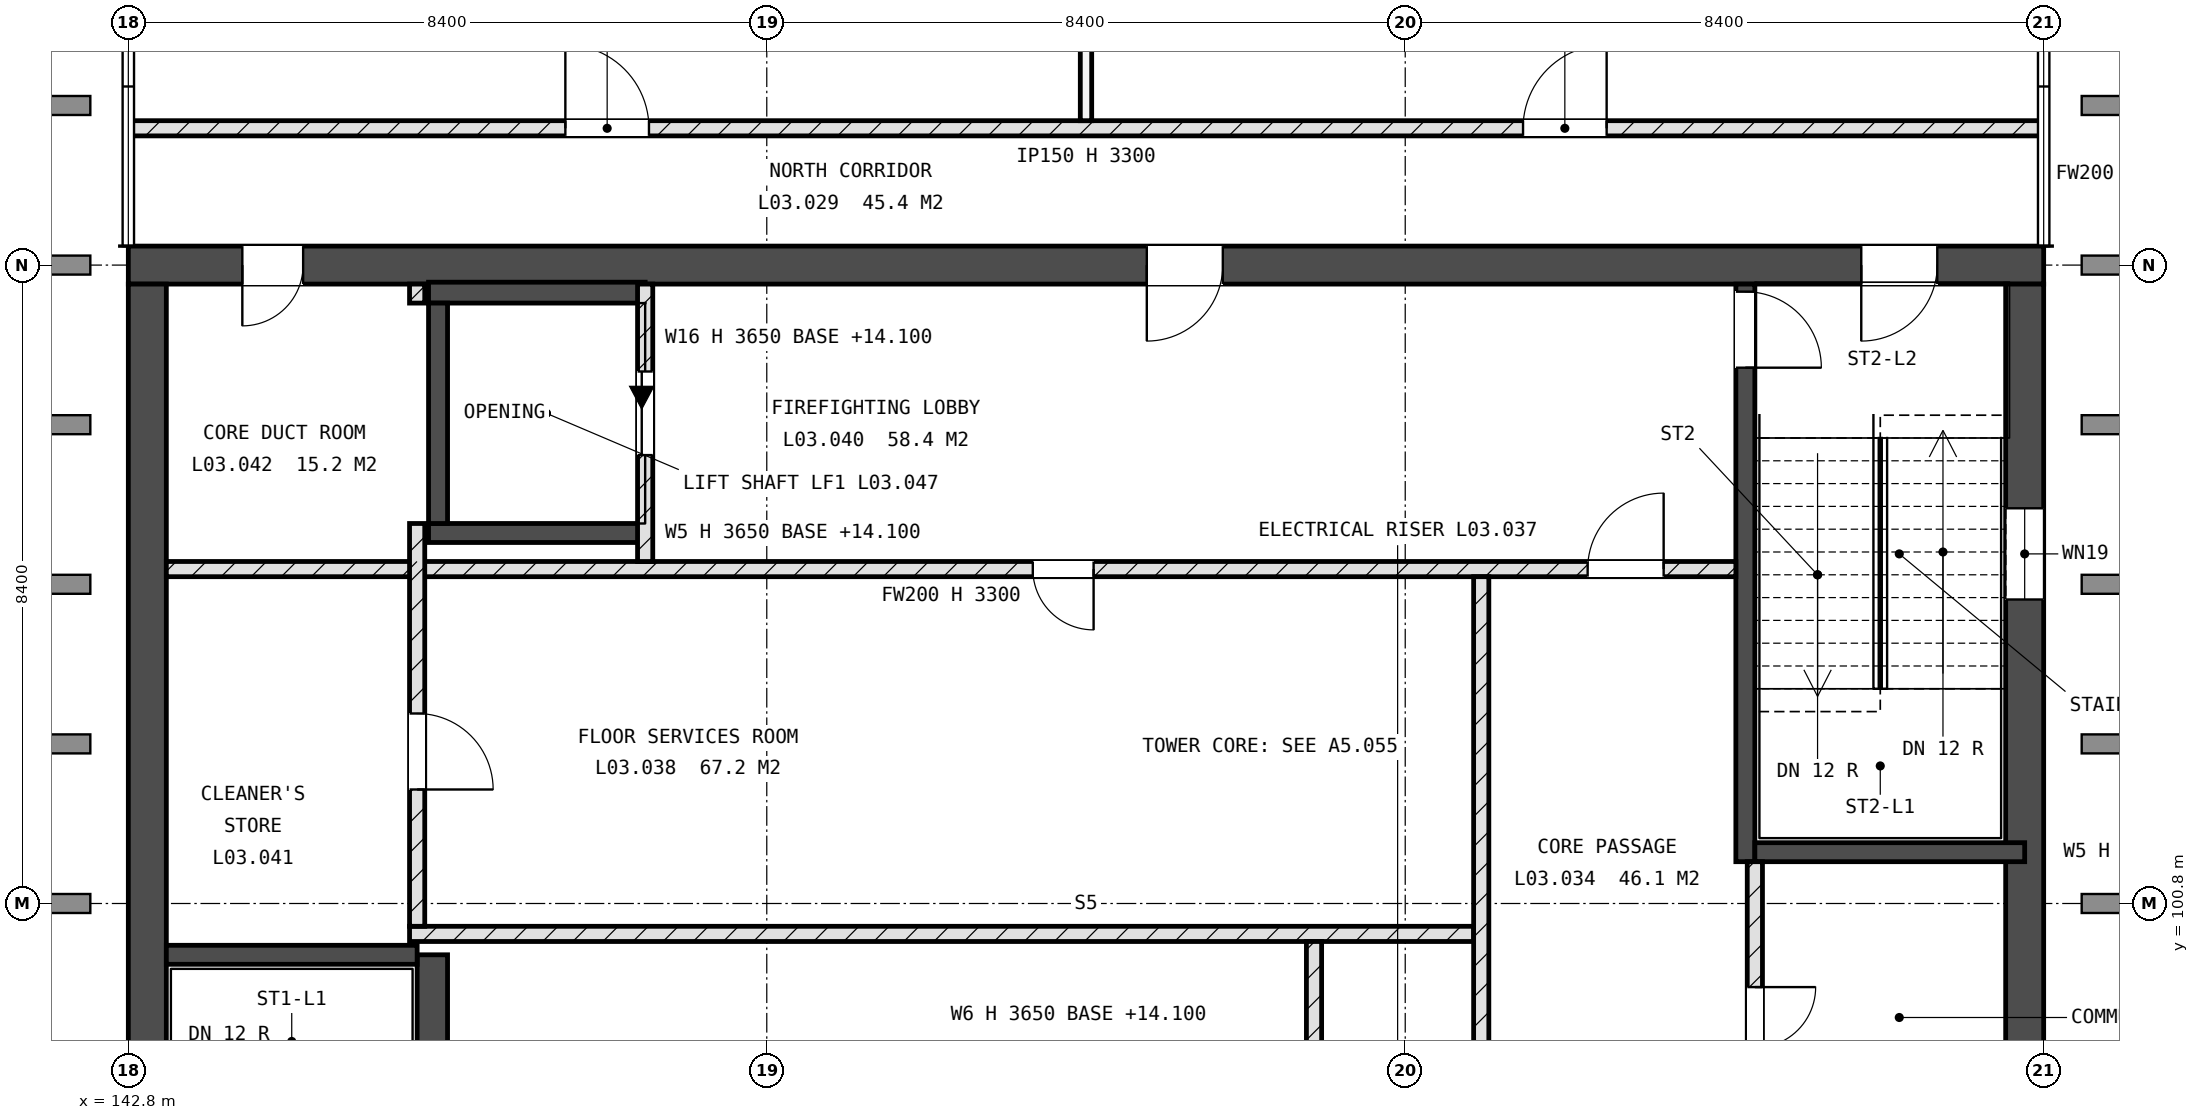
"""IFC4 building model, lengths in metres.
Left out: names, types, materials, properties, quantities, classifications, styles, units other than length and angle.
Written with IfcOpenShell. Run it as: python <this file> out.ifc"""

import sys

from ifc_helpers import new_model, si_unit, direction, frame, frame_2d, origin, place, context, subcontext, project, spatial, rectangle, extrude, element, fill, save


model = new_model("IFC4")
c1 = context("Model", 3, precision=1e-05, world=origin(), true_north=direction((0.0, 1.0)))
c2 = subcontext(c1, "Body", "Model", "MODEL_VIEW")
j1 = project(units=[si_unit("LENGTHUNIT", "METRE"), si_unit("PLANEANGLEUNIT", "RADIAN")], contexts=[c1])
p1 = place(None, origin())
s1 = spatial("IfcSite", under=j1, at=p1, CompositionType="ELEMENT")
p2 = place(p1, origin())
s2 = spatial("IfcBuilding", under=s1, at=p2, CompositionType="ELEMENT")
p3 = place(p2, frame((0.0, 0.0, 14.4)))
s3 = spatial("IfcBuildingStorey", under=s2, at=p3, CompositionType="ELEMENT", Elevation=14.4)
p4 = place(p3, frame((142.8, 109.2, -0.3), z_axis=(0.0, 0.0, 1.0), x_axis=(1.0, 0.0, 0.0)))
e1 = element("IfcWall", 1, at=p4, inside=s3, PredefinedType="SHEAR", context=c2, shape_type="SweptSolid", body=[
    extrude(rectangle(XDim=25.2, YDim=0.5, at=frame_2d((12.6, 0.0))), origin(), (0.0, 0.0, 1.0), 3.65),
])
p5 = place(p4, frame((22.8, 0.0, 0.3)))
e2 = element("IfcOpeningElement", 2, at=p5, cuts=e1, PredefinedType="OPENING", context=c2, shape_type="SweptSolid", body=[
    extrude(rectangle(XDim=1.0, YDim=2.1, at=frame_2d((0.5, 1.05))), frame((0.0, 0.26, 0.0), z_axis=(0.0, -1.0, 0.0), x_axis=(1.0, 0.0, 0.0)), (0.0, 0.0, 1.0), 0.52),
])
p6 = place(p4, frame((1.5, 0.0, 0.3)))
e3 = element("IfcOpeningElement", 3, at=p6, cuts=e1, PredefinedType="OPENING", context=c2, shape_type="SweptSolid", body=[
    extrude(rectangle(XDim=0.8, YDim=2.1, at=frame_2d((0.4, 1.05))), frame((0.0, 0.26, 0.0), z_axis=(0.0, -1.0, 0.0), x_axis=(1.0, 0.0, 0.0)), (0.0, 0.0, 1.0), 0.52),
])
p7 = place(p4, frame((13.4, 0.0, 0.3)))
e4 = element("IfcOpeningElement", 4, at=p7, cuts=e1, PredefinedType="OPENING", context=c2, shape_type="SweptSolid", body=[
    extrude(rectangle(XDim=1.0, YDim=2.1, at=frame_2d((0.5, 1.05))), frame((0.0, 0.26, 0.0), z_axis=(0.0, -1.0, 0.0), x_axis=(1.0, 0.0, 0.0)), (0.0, 0.0, 1.0), 0.52),
])
p8 = place(p3, frame((143.05, 92.65, -0.3), z_axis=(0.0, 0.0, 1.0), x_axis=(0.0, 1.0, 0.0)))
e5 = element("IfcWall", 5, at=p8, inside=s3, PredefinedType="SHEAR", context=c2, shape_type="SweptSolid", body=[
    extrude(rectangle(XDim=16.3, YDim=0.5, at=frame_2d((8.15, 0.0))), origin(), (0.0, 0.0, 1.0), 3.65),
])
p9 = place(p8, frame((2.95, 0.0, 1.9)))
e6 = element("IfcOpeningElement", 6, at=p9, cuts=e5, PredefinedType="OPENING", context=c2, shape_type="SweptSolid", body=[
    extrude(rectangle(XDim=1.2, YDim=0.9, at=frame_2d((0.6, 0.45))), frame((0.0, 0.26, 0.0), z_axis=(0.0, -1.0, 0.0), x_axis=(1.0, 0.0, 0.0)), (0.0, 0.0, 1.0), 0.52),
])
p10 = place(p3, frame((167.75, 92.65, -0.3), z_axis=(0.0, 0.0, 1.0), x_axis=(0.0, 1.0, 0.0)))
e7 = element("IfcWall", 7, at=p10, inside=s3, PredefinedType="SHEAR", context=c2, shape_type="SweptSolid", body=[
    extrude(rectangle(XDim=16.3, YDim=0.5, at=frame_2d((8.15, 0.0))), origin(), (0.0, 0.0, 1.0), 3.65),
])
p11 = place(p10, frame((12.15, 0.0, 1.9)))
e8 = element("IfcOpeningElement", 8, at=p11, cuts=e7, PredefinedType="OPENING", context=c2, shape_type="SweptSolid", body=[
    extrude(rectangle(XDim=1.2, YDim=0.9, at=frame_2d((0.6, 0.45))), frame((0.0, 0.26, 0.0), z_axis=(0.0, -1.0, 0.0), x_axis=(1.0, 0.0, 0.0)), (0.0, 0.0, 1.0), 0.52),
])
p12 = place(p3, frame((146.8, 92.65, -0.3), z_axis=(0.0, 0.0, 1.0), x_axis=(0.0, 1.0, 0.0)))
e9 = element("IfcWall", 9, at=p12, inside=s3, PredefinedType="SHEAR", context=c2, shape_type="SweptSolid", body=[
    extrude(rectangle(XDim=7.475, YDim=0.4, at=frame_2d((3.738, 0.0))), origin(), (0.0, 0.0, 1.0), 3.65),
])
p13 = place(p12, frame((0.1, 0.0, 0.3)))
e10 = element("IfcOpeningElement", 10, at=p13, cuts=e9, PredefinedType="OPENING", context=c2, shape_type="SweptSolid", body=[
    extrude(rectangle(XDim=1.0, YDim=2.1, at=frame_2d((0.5, 1.05))), frame((0.0, 0.21, 0.0), z_axis=(0.0, -1.0, 0.0), x_axis=(1.0, 0.0, 0.0)), (0.0, 0.0, 1.0), 0.42),
])
p14 = place(p3, frame((143.3, 100.125, -0.3), z_axis=(0.0, 0.0, 1.0), x_axis=(1.0, 0.0, 0.0)))
e11 = element("IfcWall", 11, at=p14, inside=s3, PredefinedType="SHEAR", context=c2, shape_type="SweptSolid", body=[
    extrude(rectangle(XDim=3.3, YDim=0.25, at=frame_2d((1.65, 0.0))), origin(), (0.0, 0.0, 1.0), 3.65),
])
p15 = place(p3, frame((164.075, 101.35, -0.3), z_axis=(0.0, 0.0, 1.0), x_axis=(0.0, 1.0, 0.0)))
e12 = element("IfcWall", 12, at=p15, inside=s3, PredefinedType="SHEAR", context=c2, shape_type="SweptSolid", body=[
    extrude(rectangle(XDim=7.6, YDim=0.25, at=frame_2d((3.8, 0.0))), origin(), (0.0, 0.0, 1.0), 3.65),
])
p16 = place(p15, frame((6.5, 0.0, 0.3)))
e13 = element("IfcOpeningElement", 13, at=p16, cuts=e12, PredefinedType="OPENING", context=c2, shape_type="SweptSolid", body=[
    extrude(rectangle(XDim=1.0, YDim=2.1, at=frame_2d((0.5, 1.05))), frame((0.0, 0.135, 0.0), z_axis=(0.0, -1.0, 0.0), x_axis=(1.0, 0.0, 0.0)), (0.0, 0.0, 1.0), 0.27),
])
p17 = place(p3, frame((164.2, 101.475, -0.3), z_axis=(0.0, 0.0, 1.0), x_axis=(1.0, 0.0, 0.0)))
e14 = element("IfcWall", 14, at=p17, inside=s3, PredefinedType="SHEAR", context=c2, shape_type="SweptSolid", body=[
    extrude(rectangle(XDim=3.55, YDim=0.25, at=frame_2d((1.775, 0.0))), origin(), (0.0, 0.0, 1.0), 3.65),
])
p18 = place(p3, frame((146.75, 105.675, -0.3), z_axis=(0.0, 0.0, 1.0), x_axis=(1.0, 0.0, 0.0)))
e15 = element("IfcWall", 15, at=p18, inside=s3, PredefinedType="SHEAR", context=c2, shape_type="SweptSolid", body=[
    extrude(rectangle(XDim=2.85, YDim=0.25, at=frame_2d((1.425, 0.0))), origin(), (0.0, 0.0, 1.0), 3.65),
])
p19 = place(p3, frame((146.75, 108.837, -0.3), z_axis=(0.0, 0.0, 1.0), x_axis=(1.0, 0.0, 0.0)))
e16 = element("IfcWall", 16, at=p19, inside=s3, PredefinedType="SHEAR", context=c2, shape_type="SweptSolid", body=[
    extrude(rectangle(XDim=2.85, YDim=0.275, at=frame_2d((1.425, 0.0))), origin(), (0.0, 0.0, 1.0), 3.65),
])
p20 = place(p3, frame((146.875, 105.8, -0.3), z_axis=(0.0, 0.0, 1.0), x_axis=(0.0, 1.0, 0.0)))
e17 = element("IfcWall", 17, at=p20, inside=s3, PredefinedType="SHEAR", context=c2, shape_type="SweptSolid", body=[
    extrude(rectangle(XDim=2.9, YDim=0.25, at=frame_2d((1.45, 0.0))), origin(), (0.0, 0.0, 1.0), 3.65),
])
p21 = place(p3, frame((146.5, 100.4, 0.0), z_axis=(0.0, 0.0, 1.0), x_axis=(1.0, 0.0, 0.0)))
e18 = element("IfcWall", 18, at=p21, inside=s3, PredefinedType="SOLIDWALL", context=c2, shape_type="SweptSolid", body=[
    extrude(rectangle(XDim=14.0, YDim=0.2, at=frame_2d((7.0, 0.0))), origin(), (0.0, 0.0, 1.0), 3.3),
])
p22 = place(p3, frame((143.3, 105.2, 0.0), z_axis=(0.0, 0.0, 1.0), x_axis=(1.0, 0.0, 0.0)))
e19 = element("IfcWall", 19, at=p22, inside=s3, PredefinedType="SOLIDWALL", context=c2, shape_type="SweptSolid", body=[
    extrude(rectangle(XDim=20.65, YDim=0.2, at=frame_2d((10.325, 0.0))), origin(), (0.0, 0.0, 1.0), 3.3),
])
p23 = place(p22, frame((11.4, 0.0, 0.0)))
e20 = element("IfcOpeningElement", 20, at=p23, cuts=e19, PredefinedType="OPENING", context=c2, shape_type="SweptSolid", body=[
    extrude(rectangle(XDim=0.8, YDim=2.1, at=frame_2d((0.4, 1.05))), frame((0.0, 0.11, 0.0), z_axis=(0.0, -1.0, 0.0), x_axis=(1.0, 0.0, 0.0)), (0.0, 0.0, 1.0), 0.22),
])
p24 = place(p22, frame((18.7, 0.0, 0.0)))
e21 = element("IfcOpeningElement", 21, at=p24, cuts=e19, PredefinedType="OPENING", context=c2, shape_type="SweptSolid", body=[
    extrude(rectangle(XDim=1.0, YDim=2.1, at=frame_2d((0.5, 1.05))), frame((0.0, 0.11, 0.0), z_axis=(0.0, -1.0, 0.0), x_axis=(1.0, 0.0, 0.0)), (0.0, 0.0, 1.0), 0.22),
])
p25 = place(p3, frame((142.8, 111.0, 0.0), z_axis=(0.0, 0.0, 1.0), x_axis=(1.0, 0.0, 0.0)))
e22 = element("IfcWall", 22, at=p25, inside=s3, PredefinedType="SOLIDWALL", context=c2, shape_type="SweptSolid", body=[
    extrude(rectangle(XDim=25.2, YDim=0.2, at=frame_2d((12.6, 0.0))), origin(), (0.0, 0.0, 1.0), 3.3),
])
p26 = place(p25, frame((5.75, 0.0, 0.0)))
e23 = element("IfcOpeningElement", 23, at=p26, cuts=e22, PredefinedType="OPENING", context=c2, shape_type="SweptSolid", body=[
    extrude(rectangle(XDim=1.1, YDim=2.25, at=frame_2d((0.55, 1.125))), frame((0.0, 0.11, 0.0), z_axis=(0.0, -1.0, 0.0), x_axis=(1.0, 0.0, 0.0)), (0.0, 0.0, 1.0), 0.22),
])
p27 = place(p25, frame((18.35, 0.0, 0.0)))
e24 = element("IfcOpeningElement", 24, at=p27, cuts=e22, PredefinedType="OPENING", context=c2, shape_type="SweptSolid", body=[
    extrude(rectangle(XDim=1.1, YDim=2.25, at=frame_2d((0.55, 1.125))), frame((0.0, 0.11, 0.0), z_axis=(0.0, -1.0, 0.0), x_axis=(1.0, 0.0, 0.0)), (0.0, 0.0, 1.0), 0.22),
])
p28 = place(p3, frame((146.6, 100.5, 0.0), z_axis=(0.0, 0.0, 1.0), x_axis=(0.0, 1.0, 0.0)))
e25 = element("IfcWall", 25, at=p28, inside=s3, PredefinedType="SOLIDWALL", context=c2, shape_type="SweptSolid", body=[
    extrude(rectangle(XDim=5.3, YDim=0.2, at=frame_2d((2.65, 0.0))), origin(), (0.0, 0.0, 1.0), 3.3),
])
p29 = place(p28, frame((1.8, 0.0, 0.0)))
e26 = element("IfcOpeningElement", 26, at=p29, cuts=e25, PredefinedType="OPENING", context=c2, shape_type="SweptSolid", body=[
    extrude(rectangle(XDim=1.0, YDim=2.1, at=frame_2d((0.5, 1.05))), frame((0.0, 0.11, 0.0), z_axis=(0.0, -1.0, 0.0), x_axis=(1.0, 0.0, 0.0)), (0.0, 0.0, 1.0), 0.22),
])
p30 = place(p3, frame((146.6, 108.7, 0.0), z_axis=(0.0, 0.0, 1.0), x_axis=(0.0, 1.0, 0.0)))
e27 = element("IfcWall", 27, at=p30, inside=s3, PredefinedType="SOLIDWALL", context=c2, shape_type="SweptSolid", body=[
    extrude(rectangle(XDim=0.25, YDim=0.2, at=frame_2d((0.125, 0.0))), origin(), (0.0, 0.0, 1.0), 3.3),
])
p31 = place(p3, frame((149.6, 105.3, 0.0), z_axis=(0.0, 0.0, 1.0), x_axis=(0.0, 1.0, 0.0)))
e28 = element("IfcWall", 28, at=p31, inside=s3, PredefinedType="SOLIDWALL", context=c2, shape_type="SweptSolid", body=[
    extrude(rectangle(XDim=3.65, YDim=0.2, at=frame_2d((1.825, 0.0))), origin(), (0.0, 0.0, 1.0), 3.3),
])
p32 = place(p31, frame((1.4, 0.0, 0.0)))
e29 = element("IfcOpeningElement", 29, at=p32, cuts=e28, PredefinedType="OPENING", context=c2, shape_type="SweptSolid", body=[
    extrude(rectangle(XDim=1.1, YDim=2.1, at=frame_2d((0.55, 1.05))), frame((0.0, 0.11, 0.0), z_axis=(0.0, -1.0, 0.0), x_axis=(1.0, 0.0, 0.0)), (0.0, 0.0, 1.0), 0.22),
])
p33 = place(p3, frame((155.4, 111.1, 0.0), z_axis=(0.0, 0.0, 1.0), x_axis=(0.0, 1.0, 0.0)))
e30 = element("IfcWall", 30, at=p33, inside=s3, PredefinedType="PARTITIONING", context=c2, shape_type="SweptSolid", body=[
    extrude(rectangle(XDim=6.5, YDim=0.15, at=frame_2d((3.25, 0.0))), origin(), (0.0, 0.0, 1.0), 3.3),
])
p34 = place(p3, frame((158.4, 98.7, 0.0), z_axis=(0.0, 0.0, 1.0), x_axis=(0.0, 1.0, 0.0)))
e31 = element("IfcWall", 31, at=p34, inside=s3, PredefinedType="SOLIDWALL", context=c2, shape_type="SweptSolid", body=[
    extrude(rectangle(XDim=1.6, YDim=0.2, at=frame_2d((0.8, 0.0))), origin(), (0.0, 0.0, 1.0), 3.3),
])
p35 = place(p3, frame((160.6, 92.65, 0.0), z_axis=(0.0, 0.0, 1.0), x_axis=(0.0, 1.0, 0.0)))
e32 = element("IfcWall", 32, at=p35, inside=s3, PredefinedType="SOLIDWALL", context=c2, shape_type="SweptSolid", body=[
    extrude(rectangle(XDim=12.45, YDim=0.2, at=frame_2d((6.225, 0.0))), origin(), (0.0, 0.0, 1.0), 3.3),
])
p36 = place(p35, frame((5.05, 0.0, 0.0)))
e33 = element("IfcOpeningElement", 33, at=p36, cuts=e32, PredefinedType="OPENING", context=c2, shape_type="SweptSolid", body=[
    extrude(rectangle(XDim=0.8, YDim=2.1, at=frame_2d((0.4, 1.05))), frame((0.0, 0.11, 0.0), z_axis=(0.0, -1.0, 0.0), x_axis=(1.0, 0.0, 0.0)), (0.0, 0.0, 1.0), 0.22),
])
p37 = place(p35, frame((0.75, 0.0, 0.0)))
e34 = element("IfcOpeningElement", 34, at=p37, cuts=e32, PredefinedType="OPENING", context=c2, shape_type="SweptSolid", body=[
    extrude(rectangle(XDim=1.0, YDim=2.1, at=frame_2d((0.5, 1.05))), frame((0.0, 0.11, 0.0), z_axis=(0.0, -1.0, 0.0), x_axis=(1.0, 0.0, 0.0)), (0.0, 0.0, 1.0), 0.22),
])
p38 = place(p3, frame((164.2, 92.65, 0.0), z_axis=(0.0, 0.0, 1.0), x_axis=(0.0, 1.0, 0.0)))
e35 = element("IfcWall", 35, at=p38, inside=s3, PredefinedType="SOLIDWALL", context=c2, shape_type="SweptSolid", body=[
    extrude(rectangle(XDim=8.7, YDim=0.2, at=frame_2d((4.35, 0.0))), origin(), (0.0, 0.0, 1.0), 3.3),
])
p39 = place(p38, frame((1.65, 0.0, 0.0)))
e36 = element("IfcOpeningElement", 36, at=p39, cuts=e35, PredefinedType="OPENING", context=c2, shape_type="SweptSolid", body=[
    extrude(rectangle(XDim=0.8, YDim=2.1, at=frame_2d((0.4, 1.05))), frame((0.0, 0.11, 0.0), z_axis=(0.0, -1.0, 0.0), x_axis=(1.0, 0.0, 0.0)), (0.0, 0.0, 1.0), 0.22),
])
p40 = place(p38, frame((6.25, 0.0, 0.0)))
e37 = element("IfcOpeningElement", 37, at=p40, cuts=e35, PredefinedType="OPENING", context=c2, shape_type="SweptSolid", body=[
    extrude(rectangle(XDim=0.8, YDim=2.1, at=frame_2d((0.4, 1.05))), frame((0.0, 0.11, 0.0), z_axis=(0.0, -1.0, 0.0), x_axis=(1.0, 0.0, 0.0)), (0.0, 0.0, 1.0), 0.22),
])
p41 = place(p11, origin())
e38 = element("IfcWindow", 38, at=p41, inside=s3, PartitioningType="SINGLE_PANEL", PredefinedType="WINDOW", context=c2, shape_type="SweptSolid", body=[
    extrude(rectangle(XDim=1.2, YDim=0.9, at=frame_2d((0.6, 0.45))), frame((0.0, 0.03, 0.0), z_axis=(0.0, -1.0, 0.0), x_axis=(1.0, 0.0, 0.0)), (0.0, 0.0, 1.0), 0.06),
])
fill(e8, e38)
p42 = place(p32, origin())
e39 = element("IfcDoor", 39, at=p42, inside=s3, OperationType="SLIDING_TO_LEFT", PredefinedType="DOOR", context=c2, shape_type="SweptSolid", body=[
    extrude(rectangle(XDim=1.1, YDim=2.1, at=frame_2d((0.55, 1.05))), frame((0.0, 0.025, 0.0), z_axis=(0.0, -1.0, 0.0), x_axis=(1.0, 0.0, 0.0)), (0.0, 0.0, 1.0), 0.05),
])
fill(e29, e39)
p43 = place(p16, origin())
e40 = element("IfcDoor", 40, at=p43, inside=s3, OperationType="SINGLE_SWING_LEFT", PredefinedType="DOOR", context=c2, shape_type="SweptSolid", body=[
    extrude(rectangle(XDim=1.0, YDim=2.1, at=frame_2d((0.5, 1.05))), frame((0.0, 0.025, 0.0), z_axis=(0.0, -1.0, 0.0), x_axis=(1.0, 0.0, 0.0)), (0.0, 0.0, 1.0), 0.05),
])
fill(e13, e40)
p44 = place(p5, origin())
e41 = element("IfcDoor", 41, at=p44, inside=s3, OperationType="SINGLE_SWING_LEFT", PredefinedType="DOOR", context=c2, shape_type="SweptSolid", body=[
    extrude(rectangle(XDim=1.0, YDim=2.1, at=frame_2d((0.5, 1.05))), frame((0.0, 0.025, 0.0), z_axis=(0.0, -1.0, 0.0), x_axis=(1.0, 0.0, 0.0)), (0.0, 0.0, 1.0), 0.05),
])
fill(e2, e41)
p45 = place(p26, origin())
e42 = element("IfcDoor", 42, at=p45, inside=s3, OperationType="SINGLE_SWING_RIGHT", PredefinedType="DOOR", context=c2, shape_type="SweptSolid", body=[
    extrude(rectangle(XDim=1.1, YDim=2.25, at=frame_2d((0.55, 1.125))), frame((0.0, 0.025, 0.0), z_axis=(0.0, -1.0, 0.0), x_axis=(1.0, 0.0, 0.0)), (0.0, 0.0, 1.0), 0.05),
])
fill(e23, e42)
p46 = place(p27, origin())
e43 = element("IfcDoor", 43, at=p46, inside=s3, OperationType="SINGLE_SWING_LEFT", PredefinedType="DOOR", context=c2, shape_type="SweptSolid", body=[
    extrude(rectangle(XDim=1.1, YDim=2.25, at=frame_2d((0.55, 1.125))), frame((0.0, 0.025, 0.0), z_axis=(0.0, -1.0, 0.0), x_axis=(1.0, 0.0, 0.0)), (0.0, 0.0, 1.0), 0.05),
])
fill(e24, e43)
p47 = place(p40, origin())
e44 = element("IfcDoor", 44, at=p47, inside=s3, OperationType="SINGLE_SWING_RIGHT", PredefinedType="DOOR", context=c2, shape_type="SweptSolid", body=[
    extrude(rectangle(XDim=0.8, YDim=2.1, at=frame_2d((0.4, 1.05))), frame((0.0, 0.025, 0.0), z_axis=(0.0, -1.0, 0.0), x_axis=(1.0, 0.0, 0.0)), (0.0, 0.0, 1.0), 0.05),
])
fill(e37, e44)
p48 = place(p23, origin())
e45 = element("IfcDoor", 45, at=p48, inside=s3, OperationType="SINGLE_SWING_RIGHT", PredefinedType="DOOR", context=c2, shape_type="SweptSolid", body=[
    extrude(rectangle(XDim=0.8, YDim=2.1, at=frame_2d((0.4, 1.05))), frame((0.0, 0.025, 0.0), z_axis=(0.0, -1.0, 0.0), x_axis=(1.0, 0.0, 0.0)), (0.0, 0.0, 1.0), 0.05),
])
fill(e20, e45)
p49 = place(p29, origin())
e46 = element("IfcDoor", 46, at=p49, inside=s3, OperationType="SINGLE_SWING_LEFT", PredefinedType="DOOR", context=c2, shape_type="SweptSolid", body=[
    extrude(rectangle(XDim=1.0, YDim=2.1, at=frame_2d((0.5, 1.05))), frame((0.0, 0.025, 0.0), z_axis=(0.0, -1.0, 0.0), x_axis=(1.0, 0.0, 0.0)), (0.0, 0.0, 1.0), 0.05),
])
fill(e26, e46)
p50 = place(p6, origin())
e47 = element("IfcDoor", 47, at=p50, inside=s3, OperationType="SINGLE_SWING_LEFT", PredefinedType="DOOR", context=c2, shape_type="SweptSolid", body=[
    extrude(rectangle(XDim=0.8, YDim=2.1, at=frame_2d((0.4, 1.05))), frame((0.0, 0.025, 0.0), z_axis=(0.0, -1.0, 0.0), x_axis=(1.0, 0.0, 0.0)), (0.0, 0.0, 1.0), 0.05),
])
fill(e3, e47)
p51 = place(p7, origin())
e48 = element("IfcDoor", 48, at=p51, inside=s3, OperationType="SINGLE_SWING_LEFT", PredefinedType="DOOR", context=c2, shape_type="SweptSolid", body=[
    extrude(rectangle(XDim=1.0, YDim=2.1, at=frame_2d((0.5, 1.05))), frame((0.0, 0.025, 0.0), z_axis=(0.0, -1.0, 0.0), x_axis=(1.0, 0.0, 0.0)), (0.0, 0.0, 1.0), 0.05),
])
fill(e4, e48)
p52 = place(p24, origin())
e49 = element("IfcDoor", 49, at=p52, inside=s3, OperationType="SINGLE_SWING_LEFT", PredefinedType="DOOR", context=c2, shape_type="SweptSolid", body=[
    extrude(rectangle(XDim=1.0, YDim=2.1, at=frame_2d((0.5, 1.05))), frame((0.0, 0.025, 0.0), z_axis=(0.0, -1.0, 0.0), x_axis=(1.0, 0.0, 0.0)), (0.0, 0.0, 1.0), 0.05),
])
fill(e21, e49)
save(model, sys.argv[1])
